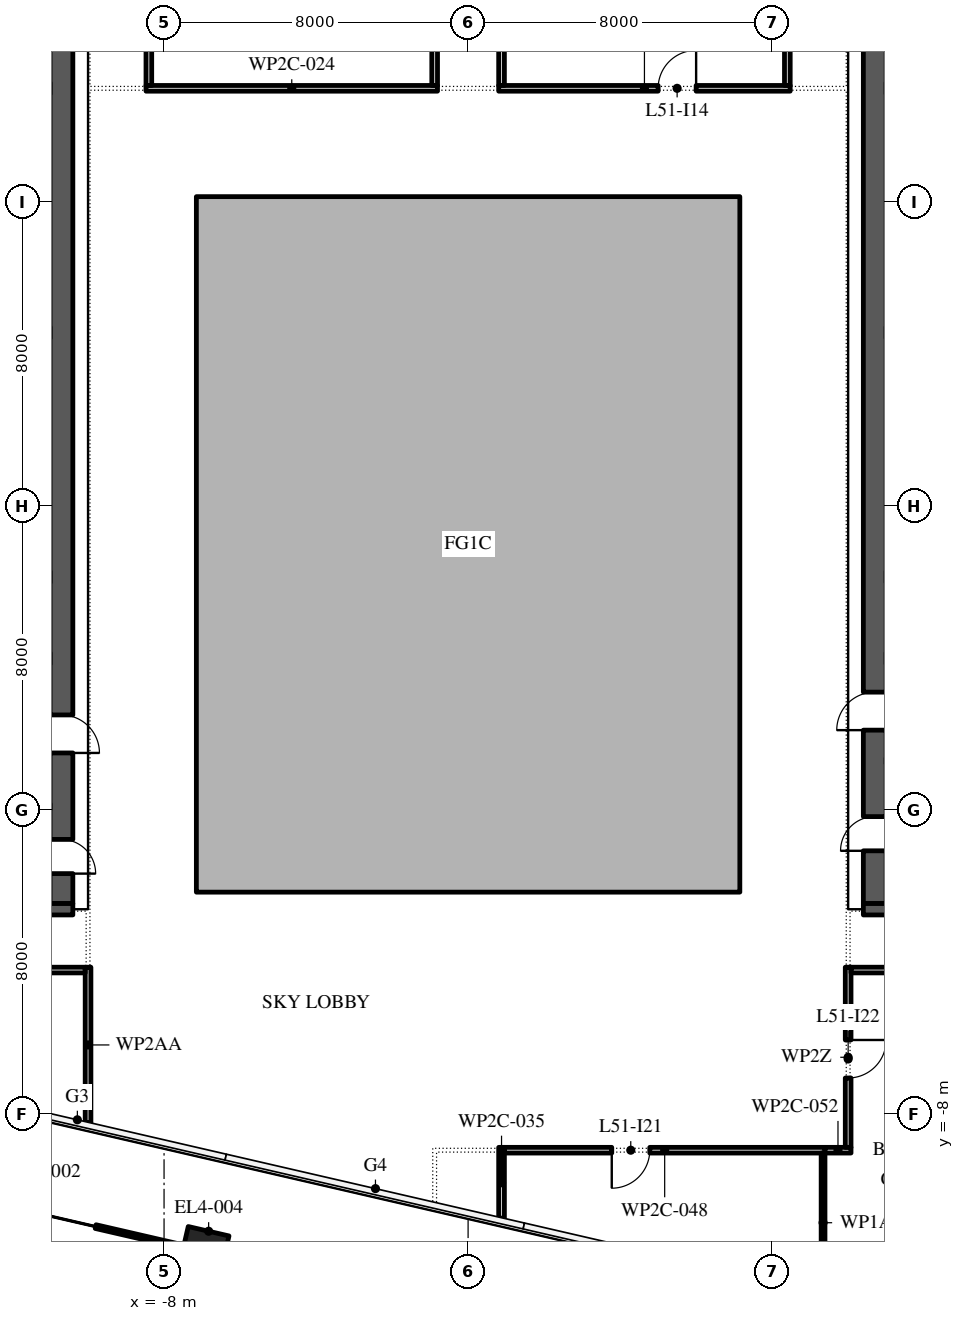
"""IFC4 building model, lengths in metres.
Left out: names, types, materials, properties, quantities, classifications, styles, units other than length and angle.
Written with IfcOpenShell. Run it as: python <this file> out.ifc"""

import sys

from ifc_helpers import new_model, si_unit, direction, frame, frame_2d, origin, origin_2d, place, context, subcontext, project, spatial, polyline, rectangle, outline, extrude, element, fill, save


model = new_model("IFC4")
c1 = context("Model", 3, precision=1e-05, world=origin(), true_north=direction((0.0, 1.0)))
c2 = subcontext(c1, "Body", "Model", "MODEL_VIEW")
j1 = project(units=[si_unit("LENGTHUNIT", "METRE"), si_unit("PLANEANGLEUNIT", "RADIAN")], contexts=[c1])
p1 = place(None, origin())
s1 = spatial("IfcSite", under=j1, at=p1, CompositionType="ELEMENT")
p2 = place(p1, origin())
s2 = spatial("IfcBuilding", under=s1, at=p2, CompositionType="ELEMENT")
p3 = place(p2, frame((0.0, 0.0, 237.0)))
s3 = spatial("IfcBuildingStorey", under=s2, at=p3, CompositionType="ELEMENT", Elevation=237.0)
p4 = place(p3, frame((-6.951, -11.608, 0.0), z_axis=(0.0, 0.0, 1.0), x_axis=(0.974370064785, -0.224951054344, 0.0)))
e1 = element("IfcColumn", 1, at=p4, inside=s3, PredefinedType="COLUMN", context=c2, shape_type="SweptSolid", body=[
    extrude(rectangle(XDim=1.1, YDim=1.1, at=origin_2d()), origin(), (0.0, 0.0, 1.0), 6.0),
])
p5 = place(p3, origin())
e2 = element("IfcWall", 2, at=p5, inside=s3, PredefinedType="STANDARD", context=c2, shape_type="SweptSolid", body=[
    extrude(outline(polyline([(-7.15, -2.15), (7.15, -2.15), (7.15, 16.15), (-7.15, 16.15), (-7.15, -2.15)]), holes=[polyline([(-7.0, -2.0), (-7.0, 16.0), (7.0, 16.0), (7.0, -2.0), (-7.0, -2.0)])]), origin(), (0.0, 0.0, 1.0), 5.8),
])
p6 = place(p3, frame((-15.019, -9.745, 0.0), z_axis=(0.0, 0.0, 1.0), x_axis=(0.974370377867, -0.224949698234, 0.0)))
e3 = element("IfcWall", 3, at=p6, inside=s3, PredefinedType="STANDARD", context=c2, shape_type="SweptSolid", body=[
    extrude(rectangle(XDim=7.71, YDim=0.1, at=frame_2d((3.855, 0.0))), origin(), (0.0, 0.0, 1.0), 4.85),
])
p7 = place(p6, frame((2.355, 0.0, 0.0)))
e4 = element("IfcOpeningElement", 4, at=p7, cuts=e3, PredefinedType="OPENING", context=c2, shape_type="SweptSolid", body=[
    extrude(rectangle(XDim=3.0, YDim=3.5, at=frame_2d((1.5, 1.75))), frame((0.0, 0.06, 0.0), z_axis=(0.0, -1.0, 0.0), x_axis=(1.0, 0.0, 0.0)), (0.0, 0.0, 1.0), 0.12),
])
p8 = place(p3, frame((-10.7, -2.45, 0.0), z_axis=(0.0, 0.0, 1.0), x_axis=(0.0, 1.0, 0.0)))
e5 = element("IfcWall", 5, at=p8, inside=s3, PredefinedType="SHEAR", context=c2, shape_type="SweptSolid", body=[
    extrude(rectangle(XDim=27.9, YDim=0.6, at=frame_2d((13.95, 0.0))), origin(), (0.0, 0.0, 1.0), 5.8),
])
p9 = place(p8, frame((23.65, 0.0, 0.0)))
e6 = element("IfcOpeningElement", 6, at=p9, cuts=e5, PredefinedType="OPENING", context=c2, shape_type="SweptSolid", body=[
    extrude(rectangle(XDim=2.4, YDim=2.1, at=frame_2d((1.2, 1.05))), frame((0.0, 0.31, 0.0), z_axis=(0.0, -1.0, 0.0), x_axis=(1.0, 0.0, 0.0)), (0.0, 0.0, 1.0), 0.62),
])
p10 = place(p8, frame((0.788, 0.0, 0.0)))
e7 = element("IfcOpeningElement", 7, at=p10, cuts=e5, PredefinedType="OPENING", context=c2, shape_type="SweptSolid", body=[
    extrude(rectangle(XDim=0.9, YDim=2.1, at=frame_2d((0.45, 1.05))), frame((0.0, 0.31, 0.0), z_axis=(0.0, -1.0, 0.0), x_axis=(1.0, 0.0, 0.0)), (0.0, 0.0, 1.0), 0.62),
])
p11 = place(p8, frame((3.962, 0.0, 0.0)))
e8 = element("IfcOpeningElement", 8, at=p11, cuts=e5, PredefinedType="OPENING", context=c2, shape_type="SweptSolid", body=[
    extrude(rectangle(XDim=1.0, YDim=2.1, at=frame_2d((0.5, 1.05))), frame((0.0, 0.31, 0.0), z_axis=(0.0, -1.0, 0.0), x_axis=(1.0, 0.0, 0.0)), (0.0, 0.0, 1.0), 0.62),
])
p12 = place(p3, frame((-21.6, -2.6, 0.0), z_axis=(0.0, 0.0, 1.0), x_axis=(1.0, 0.0, 0.0)))
e9 = element("IfcWall", 9, at=p12, inside=s3, PredefinedType="SHEAR", context=c2, shape_type="SweptSolid", body=[
    extrude(rectangle(XDim=11.2, YDim=0.3, at=frame_2d((5.6, 0.0))), origin(), (0.0, 0.0, 1.0), 5.8),
])
p13 = place(p3, frame((10.7, -2.45, 0.0), z_axis=(0.0, 0.0, 1.0), x_axis=(0.0, 1.0, 0.0)))
e10 = element("IfcWall", 10, at=p13, inside=s3, PredefinedType="SHEAR", context=c2, shape_type="SweptSolid", body=[
    extrude(rectangle(XDim=27.9, YDim=0.6, at=frame_2d((13.95, 0.0))), origin(), (0.0, 0.0, 1.0), 5.8),
])
p14 = place(p13, frame((23.65, 0.0, 0.0)))
e11 = element("IfcOpeningElement", 11, at=p14, cuts=e10, PredefinedType="OPENING", context=c2, shape_type="SweptSolid", body=[
    extrude(rectangle(XDim=2.4, YDim=2.1, at=frame_2d((1.2, 1.05))), frame((0.0, 0.31, 0.0), z_axis=(0.0, -1.0, 0.0), x_axis=(1.0, 0.0, 0.0)), (0.0, 0.0, 1.0), 0.62),
])
p15 = place(p13, frame((1.387, 0.0, 0.0)))
e12 = element("IfcOpeningElement", 12, at=p15, cuts=e10, PredefinedType="OPENING", context=c2, shape_type="SweptSolid", body=[
    extrude(rectangle(XDim=0.9, YDim=2.1, at=frame_2d((0.45, 1.05))), frame((0.0, 0.31, 0.0), z_axis=(0.0, -1.0, 0.0), x_axis=(1.0, 0.0, 0.0)), (0.0, 0.0, 1.0), 0.62),
])
p16 = place(p13, frame((4.562, 0.0, 0.0)))
e13 = element("IfcOpeningElement", 13, at=p16, cuts=e10, PredefinedType="OPENING", context=c2, shape_type="SweptSolid", body=[
    extrude(rectangle(XDim=1.0, YDim=2.1, at=frame_2d((0.5, 1.05))), frame((0.0, 0.31, 0.0), z_axis=(0.0, -1.0, 0.0), x_axis=(1.0, 0.0, 0.0)), (0.0, 0.0, 1.0), 0.62),
])
p17 = place(p3, frame((10.4, -2.6, 0.0), z_axis=(0.0, 0.0, 1.0), x_axis=(1.0, 0.0, 0.0)))
e14 = element("IfcWall", 14, at=p17, inside=s3, PredefinedType="SHEAR", context=c2, shape_type="SweptSolid", body=[
    extrude(rectangle(XDim=11.2, YDim=0.3, at=frame_2d((5.6, 0.0))), origin(), (0.0, 0.0, 1.0), 5.8),
])
p18 = place(p3, frame((-10.0, -8.216, 0.0), z_axis=(0.0, 0.0, 1.0), x_axis=(0.0, 1.0, 0.0)))
e15 = element("IfcWall", 15, at=p18, inside=s3, PredefinedType="PARTITIONING", context=c2, shape_type="SweptSolid", body=[
    extrude(rectangle(XDim=4.091, YDim=0.15, at=frame_2d((2.045, 0.0))), origin(), (0.0, 0.0, 1.0), 5.394),
])
p19 = place(p3, frame((-10.075, -4.2, 0.0), z_axis=(0.0, 0.0, 1.0), x_axis=(-1.0, 0.0, 0.0)))
e16 = element("IfcWall", 16, at=p19, inside=s3, PredefinedType="PARTITIONING", context=c2, shape_type="SweptSolid", body=[
    extrude(rectangle(XDim=11.88, YDim=0.15, at=frame_2d((5.94, 0.0))), origin(), (0.0, 0.0, 1.0), 5.8),
])
p20 = place(p19, frame((4.305, 0.0, 0.0)))
e17 = element("IfcOpeningElement", 17, at=p20, cuts=e16, PredefinedType="OPENING", context=c2, shape_type="SweptSolid", body=[
    extrude(rectangle(XDim=1.0, YDim=2.1, at=frame_2d((0.5, 1.05))), frame((0.0, 0.085, 0.0), z_axis=(0.0, -1.0, 0.0), x_axis=(1.0, 0.0, 0.0)), (0.0, 0.0, 1.0), 0.17),
])
p21 = place(p3, frame((-8.475, 19.0, 0.0), z_axis=(0.0, 0.0, 1.0), x_axis=(1.0, 0.0, 0.0)))
e18 = element("IfcWall", 18, at=p21, inside=s3, PredefinedType="PARTITIONING", context=c2, shape_type="SweptSolid", body=[
    extrude(rectangle(XDim=7.67, YDim=0.15, at=frame_2d((3.835, 0.0))), origin(), (0.0, 0.0, 1.0), 5.8),
])
p22 = place(p3, frame((-8.4, 28.19, 0.0), z_axis=(0.0, 0.0, 1.0), x_axis=(0.0, -1.0, 0.0)))
e19 = element("IfcWall", 19, at=p22, inside=s3, PredefinedType="PARTITIONING", context=c2, shape_type="SweptSolid", body=[
    extrude(rectangle(XDim=9.115, YDim=0.15, at=frame_2d((4.558, 0.0))), origin(), (0.0, 0.0, 1.0), 5.8),
])
p23 = place(p22, frame((2.29, 0.0, 0.0)))
e20 = element("IfcOpeningElement", 20, at=p23, cuts=e19, PredefinedType="OPENING", context=c2, shape_type="SweptSolid", body=[
    extrude(rectangle(XDim=1.0, YDim=2.1, at=frame_2d((0.5, 1.05))), frame((0.0, 0.085, 0.0), z_axis=(0.0, -1.0, 0.0), x_axis=(1.0, 0.0, 0.0)), (0.0, 0.0, 1.0), 0.17),
])
p24 = place(p3, frame((-0.88, 19.075, 0.0), z_axis=(0.0, 0.0, 1.0), x_axis=(0.0, 1.0, 0.0)))
e21 = element("IfcWall", 21, at=p24, inside=s3, PredefinedType="PARTITIONING", context=c2, shape_type="SweptSolid", body=[
    extrude(rectangle(XDim=9.015, YDim=0.15, at=frame_2d((4.508, 0.0))), origin(), (0.0, 0.0, 1.0), 5.8),
])
p25 = place(p3, frame((0.88, -8.865, 0.0), z_axis=(0.0, 0.0, 1.0), x_axis=(0.0, -1.0, 0.0)))
e22 = element("IfcWall", 22, at=p25, inside=s3, PredefinedType="PARTITIONING", context=c2, shape_type="SweptSolid", body=[
    extrude(rectangle(XDim=1.863, YDim=0.15, at=frame_2d((0.932, 0.0))), origin(), (0.0, 0.0, 1.0), 5.8),
])
p26 = place(p3, frame((0.805, 19.0, 0.0), z_axis=(0.0, 0.0, 1.0), x_axis=(1.0, 0.0, 0.0)))
e23 = element("IfcWall", 23, at=p26, inside=s3, PredefinedType="PARTITIONING", context=c2, shape_type="SweptSolid", body=[
    extrude(rectangle(XDim=7.67, YDim=0.15, at=frame_2d((3.835, 0.0))), origin(), (0.0, 0.0, 1.0), 5.8),
])
p27 = place(p26, frame((4.195, 0.0, 0.0)))
e24 = element("IfcOpeningElement", 24, at=p27, cuts=e23, PredefinedType="OPENING", context=c2, shape_type="SweptSolid", body=[
    extrude(rectangle(XDim=1.0, YDim=2.1, at=frame_2d((0.5, 1.05))), frame((0.0, 0.085, 0.0), z_axis=(0.0, -1.0, 0.0), x_axis=(1.0, 0.0, 0.0)), (0.0, 0.0, 1.0), 0.17),
])
p28 = place(p3, frame((0.88, 23.5, 0.0), z_axis=(0.0, 0.0, 1.0), x_axis=(0.0, -1.0, 0.0)))
e25 = element("IfcWall", 25, at=p28, inside=s3, PredefinedType="PARTITIONING", context=c2, shape_type="SweptSolid", body=[
    extrude(rectangle(XDim=4.425, YDim=0.15, at=frame_2d((2.212, 0.0))), origin(), (0.0, 0.0, 1.0), 5.8),
])
p29 = place(p3, frame((8.4, 19.075, 0.0), z_axis=(0.0, 0.0, 1.0), x_axis=(0.0, 1.0, 0.0)))
e26 = element("IfcWall", 26, at=p29, inside=s3, PredefinedType="PARTITIONING", context=c2, shape_type="SweptSolid", body=[
    extrude(rectangle(XDim=4.5, YDim=0.15, at=frame_2d((2.25, 0.0))), origin(), (0.0, 0.0, 1.0), 5.8),
])
p30 = place(p3, frame((9.39, -8.94, 0.0), z_axis=(0.0, 0.0, 1.0), x_axis=(-1.0, 0.0, 0.0)))
e27 = element("IfcWall", 27, at=p30, inside=s3, PredefinedType="PARTITIONING", context=c2, shape_type="SweptSolid", body=[
    extrude(rectangle(XDim=8.435, YDim=0.15, at=frame_2d((4.217, 0.0))), origin(), (0.0, 0.0, 1.0), 5.8),
])
p31 = place(p30, frame((4.61, 0.0, 0.0)))
e28 = element("IfcOpeningElement", 28, at=p31, cuts=e27, PredefinedType="OPENING", context=c2, shape_type="SweptSolid", body=[
    extrude(rectangle(XDim=1.0, YDim=2.1, at=frame_2d((0.5, 1.05))), frame((0.0, 0.085, 0.0), z_axis=(0.0, -1.0, 0.0), x_axis=(1.0, 0.0, 0.0)), (0.0, 0.0, 1.0), 0.17),
])
p32 = place(p3, frame((9.34, -9.015, 0.0), z_axis=(0.0, 0.0, 1.0), x_axis=(0.0, -1.0, 0.0)))
e29 = element("IfcWall", 29, at=p32, inside=s3, PredefinedType="PARTITIONING", context=c2, shape_type="SweptSolid", body=[
    extrude(rectangle(XDim=3.666, YDim=0.1, at=frame_2d((1.833, 0.0))), origin(), (0.0, 0.0, 1.0), 5.8),
])
p33 = place(p3, frame((10.075, -8.94, 0.0), z_axis=(0.0, 0.0, 1.0), x_axis=(-1.0, 0.0, 0.0)))
e30 = element("IfcWall", 30, at=p33, inside=s3, PredefinedType="PARTITIONING", context=c2, shape_type="SweptSolid", body=[
    extrude(rectangle(XDim=0.685, YDim=0.15, at=frame_2d((0.343, 0.0))), origin(), (0.0, 0.0, 1.0), 5.8),
])
p34 = place(p3, frame((10.0, -4.125, 0.0), z_axis=(0.0, 0.0, 1.0), x_axis=(0.0, -1.0, 0.0)))
e31 = element("IfcWall", 31, at=p34, inside=s3, PredefinedType="PARTITIONING", context=c2, shape_type="SweptSolid", body=[
    extrude(rectangle(XDim=4.74, YDim=0.15, at=frame_2d((2.37, 0.0))), origin(), (0.0, 0.0, 1.0), 5.198),
])
p35 = place(p34, frame((1.915, 0.0, 0.0)))
e32 = element("IfcOpeningElement", 32, at=p35, cuts=e31, PredefinedType="OPENING", context=c2, shape_type="SweptSolid", body=[
    extrude(rectangle(XDim=1.0, YDim=2.1, at=frame_2d((0.5, 1.05))), frame((0.0, 0.085, 0.0), z_axis=(0.0, -1.0, 0.0), x_axis=(1.0, 0.0, 0.0)), (0.0, 0.0, 1.0), 0.17),
])
p36 = place(p3, frame((14.19, -4.2, 0.0), z_axis=(0.0, 0.0, 1.0), x_axis=(-1.0, 0.0, 0.0)))
e33 = element("IfcWall", 33, at=p36, inside=s3, PredefinedType="PARTITIONING", context=c2, shape_type="SweptSolid", body=[
    extrude(rectangle(XDim=4.115, YDim=0.15, at=frame_2d((2.058, 0.0))), origin(), (0.0, 0.0, 1.0), 5.8),
])
p37 = place(p7, origin())
e34 = element("IfcDoor", 34, at=p37, inside=s3, OperationType="DOUBLE_DOOR_SLIDING", PredefinedType="DOOR", context=c2, shape_type="SweptSolid", body=[
    extrude(rectangle(XDim=3.0, YDim=3.5, at=frame_2d((1.5, 1.75))), frame((0.0, 0.025, 0.0), z_axis=(0.0, -1.0, 0.0), x_axis=(1.0, 0.0, 0.0)), (0.0, 0.0, 1.0), 0.05),
])
fill(e4, e34)
p38 = place(p27, origin())
e35 = element("IfcDoor", 35, at=p38, inside=s3, OperationType="SINGLE_SWING_LEFT", PredefinedType="DOOR", context=c2, shape_type="SweptSolid", body=[
    extrude(rectangle(XDim=1.0, YDim=2.1, at=frame_2d((0.5, 1.05))), frame((0.0, 0.025, 0.0), z_axis=(0.0, -1.0, 0.0), x_axis=(1.0, 0.0, 0.0)), (0.0, 0.0, 1.0), 0.05),
])
fill(e24, e35)
p39 = place(p31, origin())
e36 = element("IfcDoor", 36, at=p39, inside=s3, OperationType="SINGLE_SWING_LEFT", PredefinedType="DOOR", context=c2, shape_type="SweptSolid", body=[
    extrude(rectangle(XDim=1.0, YDim=2.1, at=frame_2d((0.5, 1.05))), frame((0.0, 0.025, 0.0), z_axis=(0.0, -1.0, 0.0), x_axis=(1.0, 0.0, 0.0)), (0.0, 0.0, 1.0), 0.05),
])
fill(e28, e36)
p40 = place(p35, origin())
e37 = element("IfcDoor", 37, at=p40, inside=s3, OperationType="SINGLE_SWING_RIGHT", PredefinedType="DOOR", context=c2, shape_type="SweptSolid", body=[
    extrude(rectangle(XDim=1.0, YDim=2.1, at=frame_2d((0.5, 1.05))), frame((0.0, 0.025, 0.0), z_axis=(0.0, -1.0, 0.0), x_axis=(1.0, 0.0, 0.0)), (0.0, 0.0, 1.0), 0.05),
])
fill(e32, e37)
save(model, sys.argv[1])
